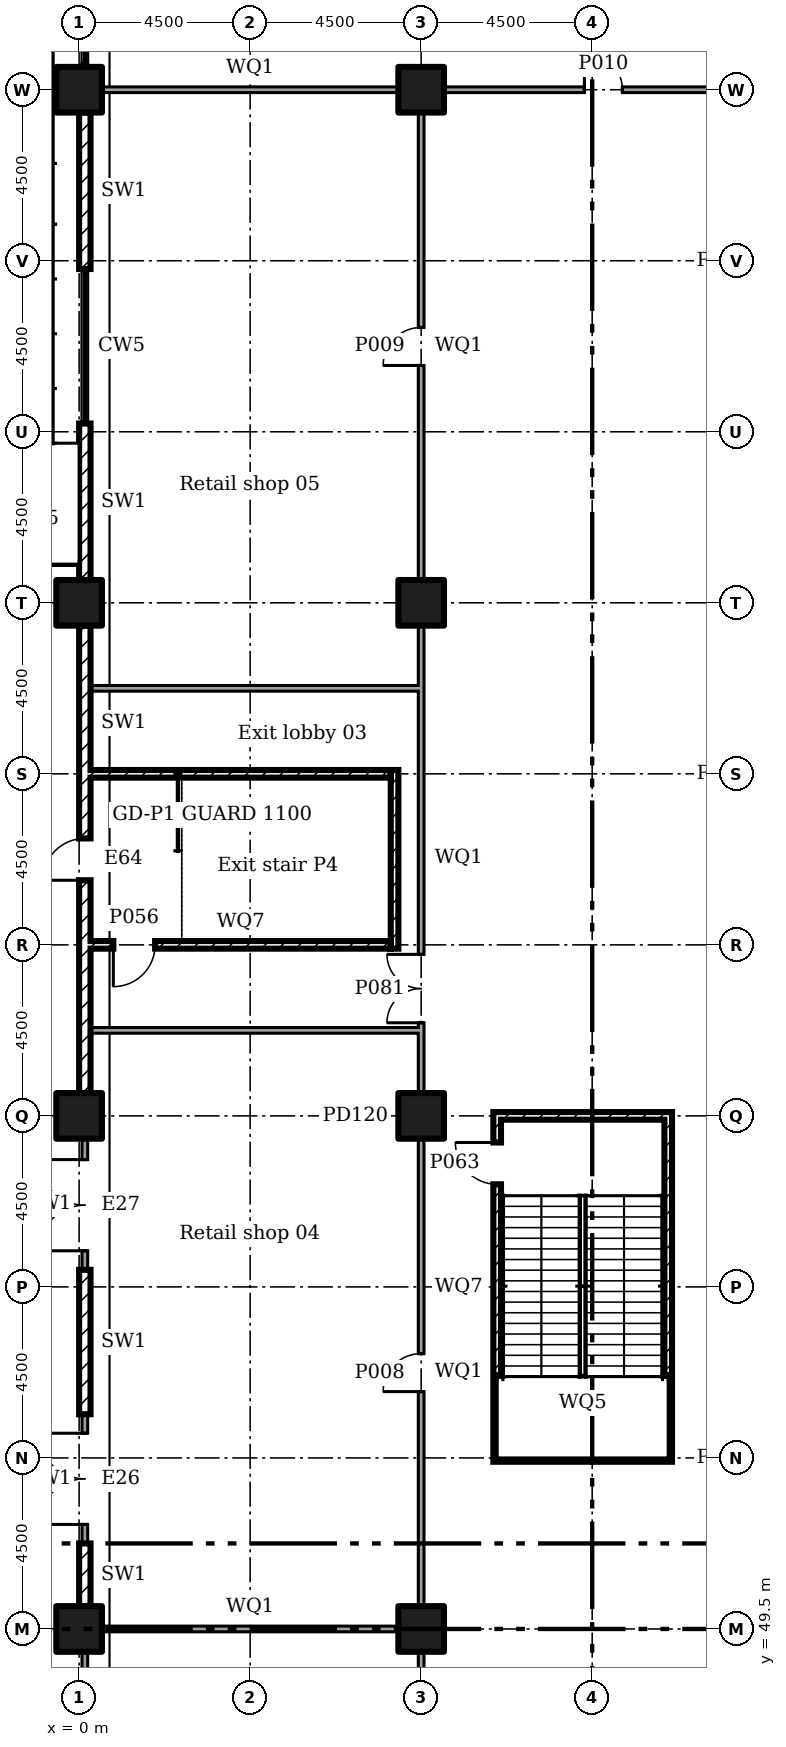
"""IFC4 building model, lengths in metres.
Left out: names, types, materials, properties, quantities, classifications, styles, units other than length and angle.
Written with IfcOpenShell. Run it as: python <this file> out.ifc"""

import sys

from ifc_helpers import new_model, si_unit, direction, frame, frame_2d, origin, origin_2d, place, context, subcontext, project, spatial, rectangle, extrude, element, fill, save


model = new_model("IFC4")
c1 = context("Model", 3, precision=1e-05, world=origin(), true_north=direction((0.0, 1.0)))
c2 = subcontext(c1, "Body", "Model", "MODEL_VIEW")
j1 = project(units=[si_unit("LENGTHUNIT", "METRE"), si_unit("PLANEANGLEUNIT", "RADIAN")], contexts=[c1])
p1 = place(None, origin())
s1 = spatial("IfcSite", under=j1, at=p1, CompositionType="ELEMENT")
p2 = place(p1, origin())
s2 = spatial("IfcBuilding", under=s1, at=p2, CompositionType="ELEMENT")
p3 = place(p2, origin())
s3 = spatial("IfcBuildingStorey", under=s2, at=p3, CompositionType="ELEMENT", Elevation=0.0)
for number, where in (
    (1, (0.0, 49.5, 0.0)),
    (2, (0.0, 63.0, 0.0)),
    (3, (0.0, 76.5, 0.0)),
    (4, (0.0, 90.0, 0.0)),
    (5, (9.0, 49.5, 0.0)),
    (6, (9.0, 63.0, 0.0)),
    (7, (9.0, 76.5, 0.0)),
    (8, (9.0, 90.0, 0.0)),
):
    element("IfcColumn", number, at=place(p3, frame(where)), inside=s3, PredefinedType="COLUMN", context=c2, shape_type="SweptSolid", body=[
        extrude(rectangle(XDim=1.2, YDim=1.2, at=origin_2d()), origin(), (0.0, 0.0, 1.0), 6.0),
    ])
for number, where, z_axis, x_axis in (
    (9, (0.15, 89.4, 0.0), (0.0, 0.0, 1.0), (0.0, -1.0, 0.0)),
    (10, (0.15, 81.217, 0.0), (0.0, 0.0, 1.0), (0.0, -1.0, 0.0)),
):
    element("IfcWall", number, at=place(p3, frame(where, z_axis=z_axis, x_axis=x_axis)), inside=s3, PredefinedType="ELEMENTEDWALL", context=c2, shape_type="SweptSolid", body=[
        extrude(rectangle(XDim=4.116, YDim=0.3, at=frame_2d((2.058, 0.0))), origin(), (0.0, 0.0, 1.0), 5.55),
    ])
p4 = place(p3, frame((0.15, 75.9, 0.0), z_axis=(0.0, 0.0, 1.0), x_axis=(0.0, -1.0, 0.0)))
e11 = element("IfcWall", 11, at=p4, inside=s3, PredefinedType="ELEMENTEDWALL", context=c2, shape_type="SweptSolid", body=[
    extrude(rectangle(XDim=5.1, YDim=0.3, at=frame_2d((2.55, 0.0))), origin(), (0.0, 0.0, 1.0), 5.55),
])
p5 = place(p3, frame((0.15, 70.8, 0.0), z_axis=(0.0, 0.0, 1.0), x_axis=(0.0, -1.0, 0.0)))
e12 = element("IfcWall", 12, at=p5, inside=s3, PredefinedType="ELEMENTEDWALL", context=c2, shape_type="SweptSolid", body=[
    extrude(rectangle(XDim=2.1, YDim=0.3, at=frame_2d((1.05, 0.0))), origin(), (0.0, 0.0, 1.0), 5.55),
])
p6 = place(p5, frame((0.5, 0.0, 0.0)))
e13 = element("IfcOpeningElement", 13, at=p6, cuts=e12, PredefinedType="OPENING", context=c2, shape_type="SweptSolid", body=[
    extrude(rectangle(XDim=1.1, YDim=2.4, at=frame_2d((0.55, 1.2))), frame((0.0, 0.16, 0.0), z_axis=(0.0, -1.0, 0.0), x_axis=(1.0, 0.0, 0.0)), (0.0, 0.0, 1.0), 0.32),
])
p7 = place(p3, frame((0.15, 68.7, 0.0), z_axis=(0.0, 0.0, 1.0), x_axis=(0.0, -1.0, 0.0)))
e14 = element("IfcWall", 14, at=p7, inside=s3, PredefinedType="ELEMENTEDWALL", context=c2, shape_type="SweptSolid", body=[
    extrude(rectangle(XDim=5.1, YDim=0.3, at=frame_2d((2.55, 0.0))), origin(), (0.0, 0.0, 1.0), 5.55),
])
p8 = place(p3, frame((0.15, 62.4, 0.0), z_axis=(0.0, 0.0, 1.0), x_axis=(0.0, -1.0, 0.0)))
e15 = element("IfcWall", 15, at=p8, inside=s3, PredefinedType="SOLIDWALL", context=c2, shape_type="SweptSolid", body=[
    extrude(rectangle(XDim=3.45, YDim=0.15, at=frame_2d((1.725, 0.0))), origin(), (0.0, 0.0, 1.0), 5.55),
])
p9 = place(p8, frame((0.55, 0.0, 0.0)))
e16 = element("IfcOpeningElement", 16, at=p9, cuts=e15, PredefinedType="OPENING", context=c2, shape_type="SweptSolid", body=[
    extrude(rectangle(XDim=2.4, YDim=2.7, at=frame_2d((1.2, 1.35))), frame((0.0, 0.085, 0.0), z_axis=(0.0, -1.0, 0.0), x_axis=(1.0, 0.0, 0.0)), (0.0, 0.0, 1.0), 0.17),
])
p10 = place(p3, frame((0.15, 58.95, 0.0), z_axis=(0.0, 0.0, 1.0), x_axis=(0.0, -1.0, 0.0)))
e17 = element("IfcWall", 17, at=p10, inside=s3, PredefinedType="ELEMENTEDWALL", context=c2, shape_type="SweptSolid", body=[
    extrude(rectangle(XDim=3.8, YDim=0.3, at=frame_2d((1.9, 0.0))), origin(), (0.0, 0.0, 1.0), 5.55),
])
p11 = place(p3, frame((0.15, 55.15, 0.0), z_axis=(0.0, 0.0, 1.0), x_axis=(0.0, -1.0, 0.0)))
e18 = element("IfcWall", 18, at=p11, inside=s3, PredefinedType="SOLIDWALL", context=c2, shape_type="SweptSolid", body=[
    extrude(rectangle(XDim=3.4, YDim=0.15, at=frame_2d((1.7, 0.0))), origin(), (0.0, 0.0, 1.0), 5.55),
])
p12 = place(p11, frame((0.5, 0.0, 0.0)))
e19 = element("IfcOpeningElement", 19, at=p12, cuts=e18, PredefinedType="OPENING", context=c2, shape_type="SweptSolid", body=[
    extrude(rectangle(XDim=2.4, YDim=2.7, at=frame_2d((1.2, 1.35))), frame((0.0, 0.085, 0.0), z_axis=(0.0, -1.0, 0.0), x_axis=(1.0, 0.0, 0.0)), (0.0, 0.0, 1.0), 0.17),
])
p13 = place(p3, frame((0.15, 51.75, 0.0), z_axis=(0.0, 0.0, 1.0), x_axis=(0.0, -1.0, 0.0)))
e20 = element("IfcWall", 20, at=p13, inside=s3, PredefinedType="ELEMENTEDWALL", context=c2, shape_type="SweptSolid", body=[
    extrude(rectangle(XDim=1.65, YDim=0.3, at=frame_2d((0.825, 0.0))), origin(), (0.0, 0.0, 1.0), 5.55),
])
p14 = place(p3, frame((0.15, 48.9, 0.0), z_axis=(0.0, 0.0, 1.0), x_axis=(0.0, -1.0, 0.0)))
e21 = element("IfcWall", 21, at=p14, inside=s3, PredefinedType="SOLIDWALL", context=c2, shape_type="SweptSolid", body=[
    extrude(rectangle(XDim=3.45, YDim=0.15, at=frame_2d((1.725, 0.0))), origin(), (0.0, 0.0, 1.0), 5.55),
])
p15 = place(p14, frame((0.55, 0.0, 0.0)))
e22 = element("IfcOpeningElement", 22, at=p15, cuts=e21, PredefinedType="OPENING", context=c2, shape_type="SweptSolid", body=[
    extrude(rectangle(XDim=2.4, YDim=2.7, at=frame_2d((1.2, 1.35))), frame((0.0, 0.085, 0.0), z_axis=(0.0, -1.0, 0.0), x_axis=(1.0, 0.0, 0.0)), (0.0, 0.0, 1.0), 0.17),
])
p16 = place(p3, frame((9.0, 40.5, 0.0), z_axis=(0.0, 0.0, 1.0), x_axis=(0.0, 1.0, 0.0)))
e23 = element("IfcWall", 23, at=p16, inside=s3, PredefinedType="PARTITIONING", context=c2, shape_type="SweptSolid", body=[
    extrude(rectangle(XDim=8.405, YDim=0.15, at=frame_2d((4.203, 0.0))), origin(), (0.0, 0.0, 1.0), 5.55),
])
p17 = place(p16, frame((3.3, 0.0, 0.0)))
e24 = element("IfcOpeningElement", 24, at=p17, cuts=e23, PredefinedType="OPENING", context=c2, shape_type="SweptSolid", body=[
    extrude(rectangle(XDim=1.8, YDim=2.1, at=frame_2d((0.9, 1.05))), frame((0.0, 0.085, 0.0), z_axis=(0.0, -1.0, 0.0), x_axis=(1.0, 0.0, 0.0)), (0.0, 0.0, 1.0), 0.17),
])
p18 = place(p3, frame((9.0, 50.095, 0.0), z_axis=(0.0, 0.0, 1.0), x_axis=(0.0, 1.0, 0.0)))
e25 = element("IfcWall", 25, at=p18, inside=s3, PredefinedType="PARTITIONING", context=c2, shape_type="SweptSolid", body=[
    extrude(rectangle(XDim=12.31, YDim=0.15, at=frame_2d((6.155, 0.0))), origin(), (0.0, 0.0, 1.0), 5.55),
])
p19 = place(p18, frame((5.65, 0.0, 0.0)))
e26 = element("IfcOpeningElement", 26, at=p19, cuts=e25, PredefinedType="OPENING", context=c2, shape_type="SweptSolid", body=[
    extrude(rectangle(XDim=1.0, YDim=2.1, at=frame_2d((0.5, 1.05))), frame((0.0, 0.085, 0.0), z_axis=(0.0, -1.0, 0.0), x_axis=(1.0, 0.0, 0.0)), (0.0, 0.0, 1.0), 0.17),
])
p20 = place(p3, frame((9.0, 63.595, 0.0), z_axis=(0.0, 0.0, 1.0), x_axis=(0.0, 1.0, 0.0)))
e27 = element("IfcWall", 27, at=p20, inside=s3, PredefinedType="PARTITIONING", context=c2, shape_type="SweptSolid", body=[
    extrude(rectangle(XDim=1.73, YDim=0.15, at=frame_2d((0.865, 0.0))), origin(), (0.0, 0.0, 1.0), 5.55),
])
p21 = place(p3, frame((9.0, 65.25, 0.0), z_axis=(0.0, 0.0, 1.0), x_axis=(0.0, 1.0, 0.0)))
e28 = element("IfcWall", 28, at=p21, inside=s3, PredefinedType="PARTITIONING", context=c2, shape_type="SweptSolid", body=[
    extrude(rectangle(XDim=9.075, YDim=0.15, at=frame_2d((4.538, 0.0))), origin(), (0.0, 0.0, 1.0), 5.55),
])
p22 = place(p21, frame((0.2, 0.0, 0.0)))
e29 = element("IfcOpeningElement", 29, at=p22, cuts=e28, PredefinedType="OPENING", context=c2, shape_type="SweptSolid", body=[
    extrude(rectangle(XDim=1.8, YDim=2.1, at=frame_2d((0.9, 1.05))), frame((0.0, 0.085, 0.0), z_axis=(0.0, -1.0, 0.0), x_axis=(1.0, 0.0, 0.0)), (0.0, 0.0, 1.0), 0.17),
])
p23 = place(p3, frame((9.0, 74.25, 0.0), z_axis=(0.0, 0.0, 1.0), x_axis=(0.0, 1.0, 0.0)))
e30 = element("IfcWall", 30, at=p23, inside=s3, PredefinedType="PARTITIONING", context=c2, shape_type="SweptSolid", body=[
    extrude(rectangle(XDim=1.655, YDim=0.15, at=frame_2d((0.828, 0.0))), origin(), (0.0, 0.0, 1.0), 5.55),
])
p24 = place(p3, frame((9.0, 77.095, 0.0), z_axis=(0.0, 0.0, 1.0), x_axis=(0.0, 1.0, 0.0)))
e31 = element("IfcWall", 31, at=p24, inside=s3, PredefinedType="PARTITIONING", context=c2, shape_type="SweptSolid", body=[
    extrude(rectangle(XDim=12.31, YDim=0.15, at=frame_2d((6.155, 0.0))), origin(), (0.0, 0.0, 1.0), 5.55),
])
p25 = place(p24, frame((5.65, 0.0, 0.0)))
e32 = element("IfcOpeningElement", 32, at=p25, cuts=e31, PredefinedType="OPENING", context=c2, shape_type="SweptSolid", body=[
    extrude(rectangle(XDim=1.0, YDim=2.1, at=frame_2d((0.5, 1.05))), frame((0.0, 0.085, 0.0), z_axis=(0.0, -1.0, 0.0), x_axis=(1.0, 0.0, 0.0)), (0.0, 0.0, 1.0), 0.17),
])
p26 = place(p3, frame((9.595, 90.0, 0.0)))
e33 = element("IfcWall", 33, at=p26, inside=s3, PredefinedType="PARTITIONING", context=c2, shape_type="SweptSolid", body=[
    extrude(rectangle(XDim=8.48, YDim=0.15, at=frame_2d((4.24, 0.0))), origin(), (0.0, 0.0, 1.0), 5.55),
])
p27 = place(p26, frame((3.7, 0.0, 0.0)))
e34 = element("IfcOpeningElement", 34, at=p27, cuts=e33, PredefinedType="OPENING", context=c2, shape_type="SweptSolid", body=[
    extrude(rectangle(XDim=1.0, YDim=2.1, at=frame_2d((0.5, 1.05))), frame((0.0, 0.085, 0.0), z_axis=(0.0, -1.0, 0.0), x_axis=(1.0, 0.0, 0.0)), (0.0, 0.0, 1.0), 0.17),
])
p28 = place(p3, frame((11.0, 53.9, 0.0), z_axis=(0.0, 0.0, 1.0), x_axis=(0.0, 1.0, 0.0)))
e35 = element("IfcWall", 35, at=p28, inside=s3, PredefinedType="SOLIDWALL", context=c2, shape_type="SweptSolid", body=[
    extrude(rectangle(XDim=9.2, YDim=0.2, at=frame_2d((4.6, 0.0))), origin(), (0.0, 0.0, 1.0), 5.55),
])
p29 = place(p28, frame((7.3, 0.0, 0.0)))
e36 = element("IfcOpeningElement", 36, at=p29, cuts=e35, PredefinedType="OPENING", context=c2, shape_type="SweptSolid", body=[
    extrude(rectangle(XDim=1.1, YDim=2.1, at=frame_2d((0.55, 1.05))), frame((0.0, 0.11, 0.0), z_axis=(0.0, -1.0, 0.0), x_axis=(1.0, 0.0, 0.0)), (0.0, 0.0, 1.0), 0.22),
])
p30 = place(p3, frame((15.5, 53.9, 0.0), z_axis=(0.0, 0.0, 1.0), x_axis=(0.0, 1.0, 0.0)))
e37 = element("IfcWall", 37, at=p30, inside=s3, PredefinedType="SOLIDWALL", context=c2, shape_type="SweptSolid", body=[
    extrude(rectangle(XDim=9.2, YDim=0.2, at=frame_2d((4.6, 0.0))), origin(), (0.0, 0.0, 1.0), 5.55),
])
for number, where in (
    (38, (11.1, 54.0, 0.0)),
    (39, (11.1, 63.0, 0.0)),
):
    element("IfcWall", number, at=place(p3, frame(where)), inside=s3, PredefinedType="SOLIDWALL", context=c2, shape_type="SweptSolid", body=[
        extrude(rectangle(XDim=4.3, YDim=0.2, at=frame_2d((2.15, 0.0))), origin(), (0.0, 0.0, 1.0), 5.55),
    ])
p31 = place(p3, frame((0.595, 49.5, 0.0)))
e40 = element("IfcWall", 40, at=p31, inside=s3, PredefinedType="PARTITIONING", context=c2, shape_type="SweptSolid", body=[
    extrude(rectangle(XDim=7.81, YDim=0.15, at=frame_2d((3.905, 0.0))), origin(), (0.0, 0.0, 1.0), 5.55),
])
for number, where in (
    (41, (0.3, 65.25, 0.0)),
    (42, (0.3, 74.25, 0.0)),
):
    element("IfcWall", number, at=place(p3, frame(where)), inside=s3, PredefinedType="PARTITIONING", context=c2, shape_type="SweptSolid", body=[
        extrude(rectangle(XDim=8.625, YDim=0.15, at=frame_2d((4.312, 0.0))), origin(), (0.0, 0.0, 1.0), 5.55),
    ])
p32 = place(p3, frame((8.3, 67.4, 0.0), z_axis=(0.0, 0.0, 1.0), x_axis=(0.0, 1.0, 0.0)))
e43 = element("IfcWall", 43, at=p32, inside=s3, PredefinedType="SOLIDWALL", context=c2, shape_type="SweptSolid", body=[
    extrude(rectangle(XDim=4.7, YDim=0.2, at=frame_2d((2.35, 0.0))), origin(), (0.0, 0.0, 1.0), 5.55),
])
p33 = place(p3, frame((0.3, 67.5, 0.0)))
e44 = element("IfcWall", 44, at=p33, inside=s3, PredefinedType="SOLIDWALL", context=c2, shape_type="SweptSolid", body=[
    extrude(rectangle(XDim=7.9, YDim=0.2, at=frame_2d((3.95, 0.0))), origin(), (0.0, 0.0, 1.0), 5.55),
])
p34 = place(p33, frame((0.6, 0.0, 0.0)))
e45 = element("IfcOpeningElement", 45, at=p34, cuts=e44, PredefinedType="OPENING", context=c2, shape_type="SweptSolid", body=[
    extrude(rectangle(XDim=1.1, YDim=2.1, at=frame_2d((0.55, 1.05))), frame((0.0, 0.11, 0.0), z_axis=(0.0, -1.0, 0.0), x_axis=(1.0, 0.0, 0.0)), (0.0, 0.0, 1.0), 0.22),
])
p35 = place(p3, frame((0.3, 72.0, 0.0)))
e46 = element("IfcWall", 46, at=p35, inside=s3, PredefinedType="SOLIDWALL", context=c2, shape_type="SweptSolid", body=[
    extrude(rectangle(XDim=7.9, YDim=0.2, at=frame_2d((3.95, 0.0))), origin(), (0.0, 0.0, 1.0), 5.55),
])
p36 = place(p3, frame((0.595, 90.0, 0.0)))
e47 = element("IfcWall", 47, at=p36, inside=s3, PredefinedType="PARTITIONING", context=c2, shape_type="SweptSolid", body=[
    extrude(rectangle(XDim=7.81, YDim=0.15, at=frame_2d((3.905, 0.0))), origin(), (0.0, 0.0, 1.0), 5.55),
])
for number, where, z_axis, x_axis in (
    (48, (15.4, 56.04, 0.0), (0.0, 0.0, 1.0), (-1.0, 0.0, 0.0)),
    (49, (15.4, 54.7, 0.0), (0.0, 0.0, 1.0), (-1.0, 0.0, 0.0)),
):
    element("IfcWall", number, at=place(p3, frame(where, z_axis=z_axis, x_axis=x_axis)), inside=s3, PredefinedType="SOLIDWALL", context=c2, shape_type="SweptSolid", body=[
        extrude(rectangle(XDim=4.3, YDim=0.2, at=frame_2d((2.15, 0.0))), origin(), (0.0, 0.0, 1.0), 2.8),
    ])
p37 = place(p6, frame((1.1, 0.0, 0.0), x_axis=(-1.0, 0.0, 0.0)))
e50 = element("IfcDoor", 50, at=p37, inside=s3, OperationType="SINGLE_SWING_RIGHT", PredefinedType="NOTDEFINED", context=c2, shape_type="SweptSolid", body=[
    extrude(rectangle(XDim=1.1, YDim=2.4, at=frame_2d((0.55, 1.2))), frame((0.0, 0.025, 0.0), z_axis=(0.0, -1.0, 0.0), x_axis=(1.0, 0.0, 0.0)), (0.0, 0.0, 1.0), 0.05),
])
fill(e13, e50)
p38 = place(p9, frame((2.4, 0.0, 0.0), x_axis=(-1.0, 0.0, 0.0)))
e51 = element("IfcDoor", 51, at=p38, inside=s3, OperationType="DOUBLE_DOOR_DOUBLE_SWING", PredefinedType="NOTDEFINED", context=c2, shape_type="SweptSolid", body=[
    extrude(rectangle(XDim=2.4, YDim=2.7, at=frame_2d((1.2, 1.35))), frame((0.0, 0.025, 0.0), z_axis=(0.0, -1.0, 0.0), x_axis=(1.0, 0.0, 0.0)), (0.0, 0.0, 1.0), 0.05),
])
fill(e16, e51)
p39 = place(p12, frame((2.4, 0.0, 0.0), x_axis=(-1.0, 0.0, 0.0)))
e52 = element("IfcDoor", 52, at=p39, inside=s3, OperationType="DOUBLE_DOOR_DOUBLE_SWING", PredefinedType="NOTDEFINED", context=c2, shape_type="SweptSolid", body=[
    extrude(rectangle(XDim=2.4, YDim=2.7, at=frame_2d((1.2, 1.35))), frame((0.0, 0.025, 0.0), z_axis=(0.0, -1.0, 0.0), x_axis=(1.0, 0.0, 0.0)), (0.0, 0.0, 1.0), 0.05),
])
fill(e19, e52)
p40 = place(p19, origin())
e53 = element("IfcDoor", 53, at=p40, inside=s3, OperationType="SINGLE_SWING_RIGHT", PredefinedType="DOOR", context=c2, shape_type="SweptSolid", body=[
    extrude(rectangle(XDim=1.0, YDim=2.1, at=frame_2d((0.5, 1.05))), frame((0.0, 0.025, 0.0), z_axis=(0.0, -1.0, 0.0), x_axis=(1.0, 0.0, 0.0)), (0.0, 0.0, 1.0), 0.05),
])
fill(e26, e53)
p41 = place(p25, origin())
e54 = element("IfcDoor", 54, at=p41, inside=s3, OperationType="SINGLE_SWING_RIGHT", PredefinedType="DOOR", context=c2, shape_type="SweptSolid", body=[
    extrude(rectangle(XDim=1.0, YDim=2.1, at=frame_2d((0.5, 1.05))), frame((0.0, 0.025, 0.0), z_axis=(0.0, -1.0, 0.0), x_axis=(1.0, 0.0, 0.0)), (0.0, 0.0, 1.0), 0.05),
])
fill(e32, e54)
p42 = place(p27, origin())
e55 = element("IfcDoor", 55, at=p42, inside=s3, OperationType="SINGLE_SWING_RIGHT", PredefinedType="DOOR", context=c2, shape_type="SweptSolid", body=[
    extrude(rectangle(XDim=1.0, YDim=2.1, at=frame_2d((0.5, 1.05))), frame((0.0, 0.025, 0.0), z_axis=(0.0, -1.0, 0.0), x_axis=(1.0, 0.0, 0.0)), (0.0, 0.0, 1.0), 0.05),
])
fill(e34, e55)
p43 = place(p34, frame((1.1, 0.0, 0.0), x_axis=(-1.0, 0.0, 0.0)))
e56 = element("IfcDoor", 56, at=p43, inside=s3, OperationType="SINGLE_SWING_LEFT", PredefinedType="DOOR", context=c2, shape_type="SweptSolid", body=[
    extrude(rectangle(XDim=1.1, YDim=2.1, at=frame_2d((0.55, 1.05))), frame((0.0, 0.025, 0.0), z_axis=(0.0, -1.0, 0.0), x_axis=(1.0, 0.0, 0.0)), (0.0, 0.0, 1.0), 0.05),
])
fill(e45, e56)
p44 = place(p29, origin())
e57 = element("IfcDoor", 57, at=p44, inside=s3, OperationType="SINGLE_SWING_LEFT", PredefinedType="DOOR", context=c2, shape_type="SweptSolid", body=[
    extrude(rectangle(XDim=1.1, YDim=2.1, at=frame_2d((0.55, 1.05))), frame((0.0, 0.025, 0.0), z_axis=(0.0, -1.0, 0.0), x_axis=(1.0, 0.0, 0.0)), (0.0, 0.0, 1.0), 0.05),
])
fill(e36, e57)
p45 = place(p22, origin())
e58 = element("IfcDoor", 58, at=p45, inside=s3, OperationType="DOUBLE_DOOR_SINGLE_SWING", PredefinedType="DOOR", context=c2, shape_type="SweptSolid", body=[
    extrude(rectangle(XDim=1.8, YDim=2.1, at=frame_2d((0.9, 1.05))), frame((0.0, 0.025, 0.0), z_axis=(0.0, -1.0, 0.0), x_axis=(1.0, 0.0, 0.0)), (0.0, 0.0, 1.0), 0.05),
])
fill(e29, e58)
save(model, sys.argv[1])
